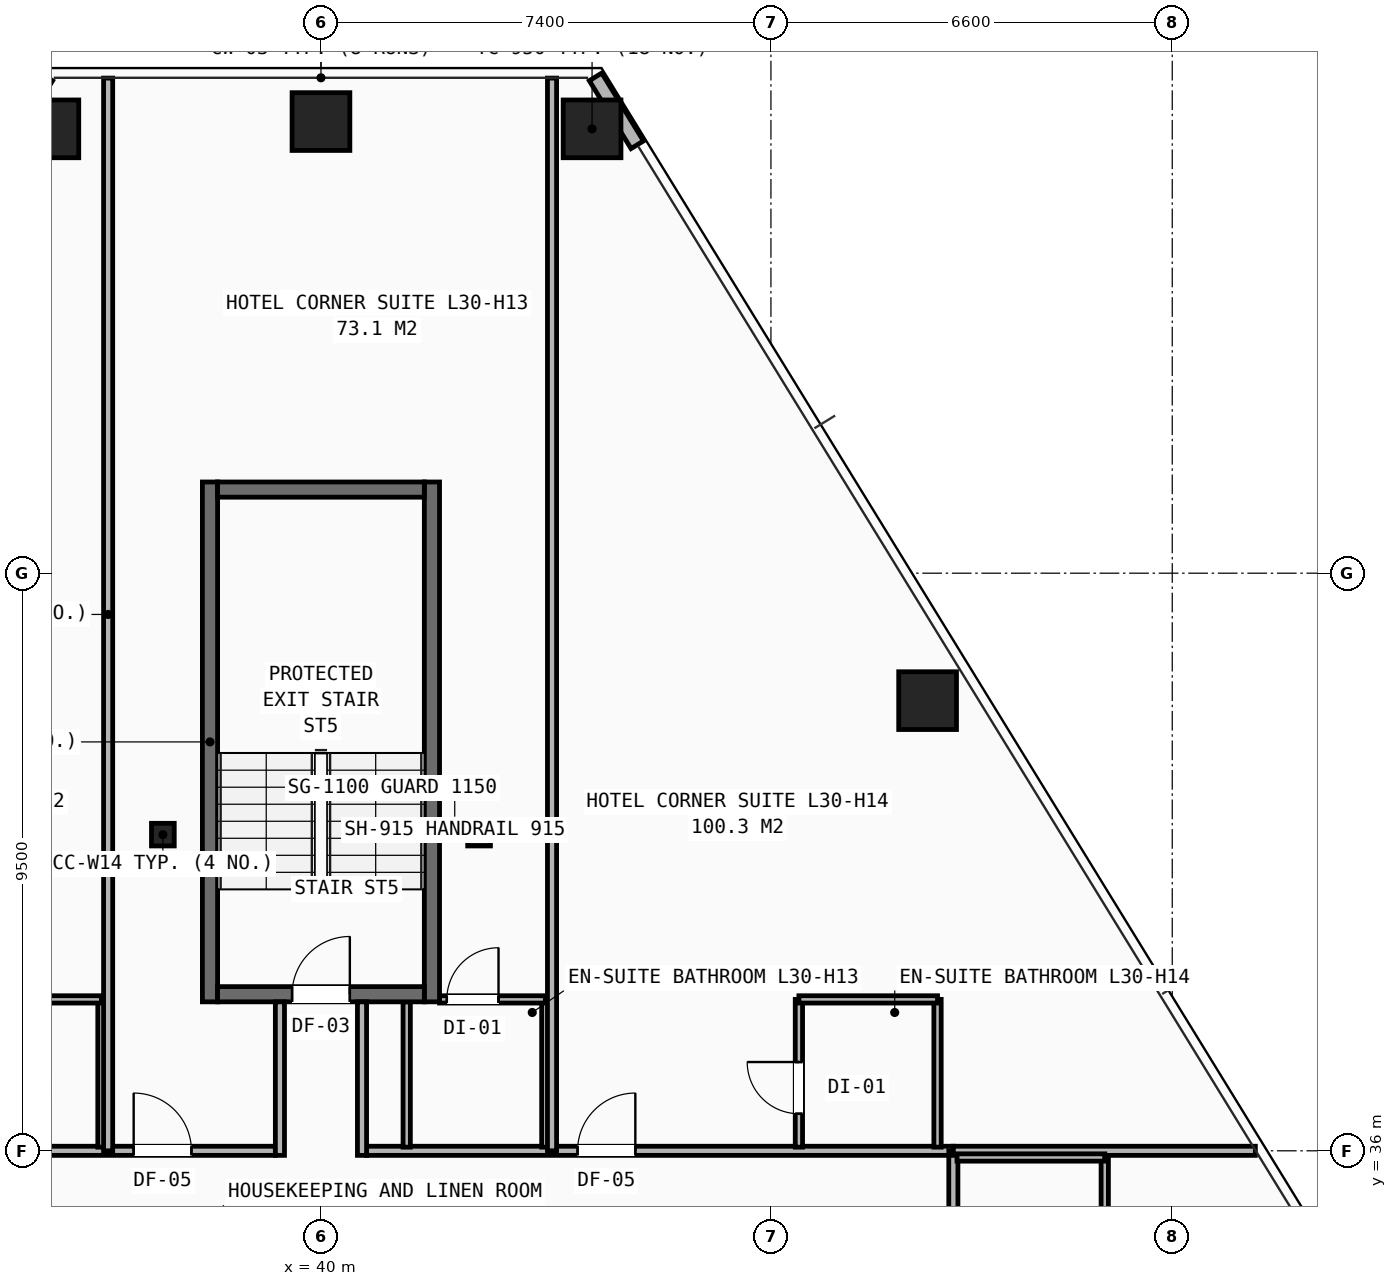
"""IFC4 building model, lengths in metres.
Left out: names, types, materials, properties, quantities, classifications, styles, units other than length and angle.
Written with IfcOpenShell. Run it as: python <this file> out.ifc"""

import sys

from ifc_helpers import new_model, si_unit, direction, frame, frame_2d, origin, origin_2d, place, context, subcontext, project, spatial, rectangle, hollow_rectangle, i_section, extrude, element, fill, save


model = new_model("IFC4")
c1 = context("Model", 3, precision=1e-05, world=origin(), true_north=direction((0.0, 1.0)))
c2 = subcontext(c1, "Body", "Model", "MODEL_VIEW")
j1 = project(units=[si_unit("LENGTHUNIT", "METRE"), si_unit("PLANEANGLEUNIT", "RADIAN")], contexts=[c1])
p1 = place(None, origin())
s1 = spatial("IfcSite", under=j1, at=p1, CompositionType="ELEMENT")
p2 = place(p1, origin())
s2 = spatial("IfcBuilding", under=s1, at=p2, CompositionType="ELEMENT")
p3 = place(p2, frame((0.0, 0.0, 105.4)))
s3 = spatial("IfcBuildingStorey", under=s2, at=p3, CompositionType="ELEMENT", Elevation=105.4)
for number, where, z_axis, x_axis in (
    (1, (37.4, 41.2, 0.0), (0.0, 0.0, 1.0), (1.0, 0.0, 0.0)),
    (2, (42.6, 41.2, 0.0), (0.0, 0.0, 1.0), (1.0, 0.0, 0.0)),
):
    element("IfcColumn", number, at=place(p3, frame(where, z_axis=z_axis, x_axis=x_axis)), inside=s3, PredefinedType="COLUMN", context=c2, shape_type="SweptSolid", body=[
        extrude(i_section(OverallWidth=0.374, OverallDepth=0.372, WebThickness=0.016, FlangeThickness=0.026, at=origin_2d()), origin(), (0.0, 0.0, 1.0), 3.2),
    ])
for number, where, z_axis, x_axis in (
    (3, (44.458, 52.808, 0.0), (0.0, 0.0, 1.0), (1.0, 0.0, 0.0)),
    (4, (40.0, 52.928, 0.0), (0.0, 0.0, 1.0), (1.0, 0.0, 0.0)),
    (5, (35.542, 52.808, 0.0), (0.0, 0.0, 1.0), (1.0, 0.0, 0.0)),
    (6, (49.977, 43.404, 0.0), (0.0, 0.0, 1.0), (1.0, 0.0, 0.0)),
):
    element("IfcColumn", number, at=place(p3, frame(where, z_axis=z_axis, x_axis=x_axis)), inside=s3, PredefinedType="COLUMN", context=c2, shape_type="SweptSolid", body=[
        extrude(hollow_rectangle(XDim=0.95, YDim=0.95, WallThickness=0.065, at=origin_2d()), origin(), (0.0, 0.0, 1.0), 3.2),
    ])
for number, where, z_axis, x_axis in (
    (7, (35.484, 53.663, 0.0), (0.0, 0.0, 1.0), (-0.524, -0.852, 0.0)),
    (8, (45.202, 52.546, 0.0), (0.0, 0.0, 1.0), (-0.524, 0.852, 0.0)),
):
    element("IfcWall", number, at=place(p3, frame(where, z_axis=z_axis, x_axis=x_axis)), inside=s3, PredefinedType="SHEAR", context=c2, shape_type="SweptSolid", body=[
        extrude(rectangle(XDim=1.311, YDim=0.24, at=frame_2d((0.655, 0.0))), origin(), (0.0, 0.0, 1.0), 2.253),
    ])
p4 = place(p3, frame((29.6, 36.0, 0.0), z_axis=(0.0, 0.0, 1.0), x_axis=(1.0, 0.0, 0.0)))
e9 = element("IfcWall", 9, at=p4, inside=s3, PredefinedType="PARTITIONING", context=c2, shape_type="SweptSolid", body=[
    extrude(rectangle(XDim=9.65, YDim=0.15, at=frame_2d((4.825, 0.0))), origin(), (0.0, 0.0, 1.0), 2.503),
])
p5 = place(p4, frame((0.57, 0.0, 0.0)))
e10 = element("IfcOpeningElement", 10, at=p5, cuts=e9, PredefinedType="OPENING", context=c2, shape_type="SweptSolid", body=[
    extrude(rectangle(XDim=0.95, YDim=2.1, at=frame_2d((0.475, 1.05))), frame((0.0, 0.085, 0.0), z_axis=(0.0, -1.0, 0.0), x_axis=(1.0, 0.0, 0.0)), (0.0, 0.0, 1.0), 0.17),
])
p6 = place(p4, frame((7.32, 0.0, 0.0)))
e11 = element("IfcOpeningElement", 11, at=p6, cuts=e9, PredefinedType="OPENING", context=c2, shape_type="SweptSolid", body=[
    extrude(rectangle(XDim=0.95, YDim=2.1, at=frame_2d((0.475, 1.05))), frame((0.0, 0.085, 0.0), z_axis=(0.0, -1.0, 0.0), x_axis=(1.0, 0.0, 0.0)), (0.0, 0.0, 1.0), 0.17),
])
p7 = place(p3, frame((40.75, 36.0, 0.0), z_axis=(0.0, 0.0, 1.0), x_axis=(1.0, 0.0, 0.0)))
e12 = element("IfcWall", 12, at=p7, inside=s3, PredefinedType="PARTITIONING", context=c2, shape_type="SweptSolid", body=[
    extrude(rectangle(XDim=9.65, YDim=0.15, at=frame_2d((4.825, 0.0))), origin(), (0.0, 0.0, 1.0), 2.503),
])
p8 = place(p7, frame((3.47, 0.0, 0.0)))
e13 = element("IfcOpeningElement", 13, at=p8, cuts=e12, PredefinedType="OPENING", context=c2, shape_type="SweptSolid", body=[
    extrude(rectangle(XDim=0.95, YDim=2.1, at=frame_2d((0.475, 1.05))), frame((0.0, 0.085, 0.0), z_axis=(0.0, -1.0, 0.0), x_axis=(1.0, 0.0, 0.0)), (0.0, 0.0, 1.0), 0.17),
])
p9 = place(p3, frame((50.4, 14.1, 0.0), z_axis=(0.0, 0.0, 1.0), x_axis=(0.0, 1.0, 0.0)))
e14 = element("IfcWall", 14, at=p9, inside=s3, PredefinedType="PARTITIONING", context=c2, shape_type="SweptSolid", body=[
    extrude(rectangle(XDim=21.9, YDim=0.15, at=frame_2d((10.95, 0.0))), origin(), (0.0, 0.0, 1.0), 2.421),
])
p10 = place(p9, frame((0.42, 0.0, 0.0)))
e15 = element("IfcOpeningElement", 15, at=p10, cuts=e14, PredefinedType="OPENING", context=c2, shape_type="SweptSolid", body=[
    extrude(rectangle(XDim=0.95, YDim=2.1, at=frame_2d((0.475, 1.05))), frame((0.0, 0.085, 0.0), z_axis=(0.0, -1.0, 0.0), x_axis=(1.0, 0.0, 0.0)), (0.0, 0.0, 1.0), 0.17),
])
p11 = place(p9, frame((5.52, 0.0, 0.0)))
e16 = element("IfcOpeningElement", 16, at=p11, cuts=e14, PredefinedType="OPENING", context=c2, shape_type="SweptSolid", body=[
    extrude(rectangle(XDim=0.95, YDim=2.1, at=frame_2d((0.475, 1.05))), frame((0.0, 0.085, 0.0), z_axis=(0.0, -1.0, 0.0), x_axis=(1.0, 0.0, 0.0)), (0.0, 0.0, 1.0), 0.17),
])
p12 = place(p9, frame((10.92, 0.0, 0.0)))
e17 = element("IfcOpeningElement", 17, at=p12, cuts=e14, PredefinedType="OPENING", context=c2, shape_type="SweptSolid", body=[
    extrude(rectangle(XDim=0.95, YDim=2.1, at=frame_2d((0.475, 1.05))), frame((0.0, 0.085, 0.0), z_axis=(0.0, -1.0, 0.0), x_axis=(1.0, 0.0, 0.0)), (0.0, 0.0, 1.0), 0.17),
])
p13 = place(p9, frame((16.72, 0.0, 0.0)))
e18 = element("IfcOpeningElement", 18, at=p13, cuts=e14, PredefinedType="OPENING", context=c2, shape_type="SweptSolid", body=[
    extrude(rectangle(XDim=0.95, YDim=2.1, at=frame_2d((0.475, 1.05))), frame((0.0, 0.085, 0.0), z_axis=(0.0, -1.0, 0.0), x_axis=(1.0, 0.0, 0.0)), (0.0, 0.0, 1.0), 0.17),
])
p14 = place(p3, frame((50.4, 36.0, 0.0), z_axis=(0.0, 0.0, 1.0), x_axis=(1.0, 0.0, 0.0)))
e19 = element("IfcWall", 19, at=p14, inside=s3, PredefinedType="PARTITIONING", context=c2, shape_type="SweptSolid", body=[
    extrude(rectangle(XDim=4.967, YDim=0.15, at=frame_2d((2.483, 0.0))), origin(), (0.0, 0.0, 1.0), 2.258),
])
p15 = place(p3, frame((52.89, 33.61, 0.0), z_axis=(0.0, 0.0, 1.0), x_axis=(0.0, 1.0, 0.0)))
e20 = element("IfcWall", 20, at=p15, inside=s3, PredefinedType="PARTITIONING", context=c2, shape_type="SweptSolid", body=[
    extrude(rectangle(XDim=2.28, YDim=0.12, at=frame_2d((1.14, 0.0))), origin(), (0.0, 0.0, 1.0), 2.97),
])
for number, where, z_axis, x_axis in (
    (21, (50.46, 35.89, 0.0), (0.0, 0.0, 1.0), (1.0, 0.0, 0.0)),
    (22, (36.39, 36.06, 0.0), (0.0, 0.0, 1.0), (0.0, 1.0, 0.0)),
):
    element("IfcWall", number, at=place(p3, frame(where, z_axis=z_axis, x_axis=x_axis)), inside=s3, PredefinedType="PARTITIONING", context=c2, shape_type="SweptSolid", body=[
        extrude(rectangle(XDim=2.43, YDim=0.12, at=frame_2d((1.215, 0.0))), origin(), (0.0, 0.0, 1.0), 2.97),
    ])
p16 = place(p3, frame((34.11, 38.49, 0.0), z_axis=(0.0, 0.0, 1.0), x_axis=(1.0, 0.0, 0.0)))
e23 = element("IfcWall", 23, at=p16, inside=s3, PredefinedType="PARTITIONING", context=c2, shape_type="SweptSolid", body=[
    extrude(rectangle(XDim=2.28, YDim=0.12, at=frame_2d((1.14, 0.0))), origin(), (0.0, 0.0, 1.0), 2.97),
])
p17 = place(p3, frame((36.5, 36.0, 0.0), z_axis=(0.0, 0.0, 1.0), x_axis=(0.0, 1.0, 0.0)))
e24 = element("IfcWall", 24, at=p17, inside=s3, PredefinedType="PARTITIONING", context=c2, shape_type="SweptSolid", body=[
    extrude(rectangle(XDim=17.643, YDim=0.15, at=frame_2d((8.821, 0.0))), origin(), (0.0, 0.0, 1.0), 2.258),
])
p18 = place(p3, frame((41.41, 36.06, 0.0), z_axis=(0.0, 0.0, 1.0), x_axis=(0.0, 1.0, 0.0)))
e25 = element("IfcWall", 25, at=p18, inside=s3, PredefinedType="PARTITIONING", context=c2, shape_type="SweptSolid", body=[
    extrude(rectangle(XDim=2.39, YDim=0.12, at=frame_2d((1.195, 0.0))), origin(), (0.0, 0.0, 1.0), 2.97),
])
p19 = place(p3, frame((43.69, 36.06, 0.0), z_axis=(0.0, 0.0, 1.0), x_axis=(0.0, 1.0, 0.0)))
e26 = element("IfcWall", 26, at=p19, inside=s3, PredefinedType="PARTITIONING", context=c2, shape_type="SweptSolid", body=[
    extrude(rectangle(XDim=2.43, YDim=0.12, at=frame_2d((1.215, 0.0))), origin(), (0.0, 0.0, 1.0), 2.97),
])
p20 = place(p3, frame((41.95, 38.49, 0.0), z_axis=(0.0, 0.0, 1.0), x_axis=(1.0, 0.0, 0.0)))
e27 = element("IfcWall", 27, at=p20, inside=s3, PredefinedType="PARTITIONING", context=c2, shape_type="SweptSolid", body=[
    extrude(rectangle(XDim=1.74, YDim=0.12, at=frame_2d((0.87, 0.0))), origin(), (0.0, 0.0, 1.0), 2.97),
])
p21 = place(p20, frame((0.12, 0.0, 0.0)))
e28 = element("IfcOpeningElement", 28, at=p21, cuts=e27, PredefinedType="OPENING", context=c2, shape_type="SweptSolid", body=[
    extrude(rectangle(XDim=0.85, YDim=2.05, at=frame_2d((0.425, 1.025))), frame((0.0, 0.07, 0.0), z_axis=(0.0, -1.0, 0.0), x_axis=(1.0, 0.0, 0.0)), (0.0, 0.0, 1.0), 0.14),
])
p22 = place(p3, frame((43.8, 36.0, 0.0), z_axis=(0.0, 0.0, 1.0), x_axis=(0.0, 1.0, 0.0)))
e29 = element("IfcWall", 29, at=p22, inside=s3, PredefinedType="PARTITIONING", context=c2, shape_type="SweptSolid", body=[
    extrude(rectangle(XDim=17.643, YDim=0.15, at=frame_2d((8.821, 0.0))), origin(), (0.0, 0.0, 1.0), 2.258),
])
p23 = place(p3, frame((47.86, 36.06, 0.0), z_axis=(0.0, 0.0, 1.0), x_axis=(0.0, 1.0, 0.0)))
e30 = element("IfcWall", 30, at=p23, inside=s3, PredefinedType="PARTITIONING", context=c2, shape_type="SweptSolid", body=[
    extrude(rectangle(XDim=2.43, YDim=0.12, at=frame_2d((1.215, 0.0))), origin(), (0.0, 0.0, 1.0), 2.503),
])
p24 = place(p23, frame((0.55, 0.0, 0.0)))
e31 = element("IfcOpeningElement", 31, at=p24, cuts=e30, PredefinedType="OPENING", context=c2, shape_type="SweptSolid", body=[
    extrude(rectangle(XDim=0.85, YDim=2.05, at=frame_2d((0.425, 1.025))), frame((0.0, 0.07, 0.0), z_axis=(0.0, -1.0, 0.0), x_axis=(1.0, 0.0, 0.0)), (0.0, 0.0, 1.0), 0.14),
])
p25 = place(p3, frame((50.14, 36.06, 0.0), z_axis=(0.0, 0.0, 1.0), x_axis=(0.0, 1.0, 0.0)))
e32 = element("IfcWall", 32, at=p25, inside=s3, PredefinedType="PARTITIONING", context=c2, shape_type="SweptSolid", body=[
    extrude(rectangle(XDim=2.43, YDim=0.12, at=frame_2d((1.215, 0.0))), origin(), (0.0, 0.0, 1.0), 2.97),
])
p26 = place(p3, frame((47.86, 38.49, 0.0), z_axis=(0.0, 0.0, 1.0), x_axis=(1.0, 0.0, 0.0)))
e33 = element("IfcWall", 33, at=p26, inside=s3, PredefinedType="PARTITIONING", context=c2, shape_type="SweptSolid", body=[
    extrude(rectangle(XDim=2.28, YDim=0.12, at=frame_2d((1.14, 0.0))), origin(), (0.0, 0.0, 1.0), 2.503),
])
for number, where, z_axis, x_axis in (
    (34, (38.175, 38.45, 0.0), (0.0, 0.0, 1.0), (0.0, 1.0, 0.0)),
    (35, (41.825, 38.45, 0.0), (0.0, 0.0, 1.0), (0.0, 1.0, 0.0)),
):
    element("IfcWall", number, at=place(p3, frame(where, z_axis=z_axis, x_axis=x_axis)), inside=s3, PredefinedType="SHEAR", context=c2, shape_type="SweptSolid", body=[
        extrude(rectangle(XDim=8.55, YDim=0.25, at=frame_2d((4.275, 0.0))), origin(), (0.0, 0.0, 1.0), 2.97),
    ])
p27 = place(p3, frame((38.3, 38.575, 0.0), z_axis=(0.0, 0.0, 1.0), x_axis=(1.0, 0.0, 0.0)))
e36 = element("IfcWall", 36, at=p27, inside=s3, PredefinedType="SHEAR", context=c2, shape_type="SweptSolid", body=[
    extrude(rectangle(XDim=3.4, YDim=0.25, at=frame_2d((1.7, 0.0))), origin(), (0.0, 0.0, 1.0), 2.97),
])
p28 = place(p27, frame((1.225, 0.0, 0.0)))
e37 = element("IfcOpeningElement", 37, at=p28, cuts=e36, PredefinedType="OPENING", context=c2, shape_type="SweptSolid", body=[
    extrude(rectangle(XDim=0.95, YDim=2.1, at=frame_2d((0.475, 1.05))), frame((0.0, 0.135, 0.0), z_axis=(0.0, -1.0, 0.0), x_axis=(1.0, 0.0, 0.0)), (0.0, 0.0, 1.0), 0.27),
])
p29 = place(p3, frame((38.3, 46.875, 0.0), z_axis=(0.0, 0.0, 1.0), x_axis=(1.0, 0.0, 0.0)))
e38 = element("IfcWall", 38, at=p29, inside=s3, PredefinedType="SHEAR", context=c2, shape_type="SweptSolid", body=[
    extrude(rectangle(XDim=3.4, YDim=0.25, at=frame_2d((1.7, 0.0))), origin(), (0.0, 0.0, 1.0), 2.97),
])
for number, where, z_axis, x_axis in (
    (39, (39.325, 35.925, 0.0), (0.0, 0.0, 1.0), (0.0, 1.0, 0.0)),
    (40, (40.675, 35.925, 0.0), (0.0, 0.0, 1.0), (0.0, 1.0, 0.0)),
):
    element("IfcWall", number, at=place(p3, frame(where, z_axis=z_axis, x_axis=x_axis)), inside=s3, PredefinedType="PARTITIONING", context=c2, shape_type="SweptSolid", body=[
        extrude(rectangle(XDim=2.525, YDim=0.15, at=frame_2d((1.262, 0.0))), origin(), (0.0, 0.0, 1.0), 2.97),
    ])
p30 = place(p6, origin())
e41 = element("IfcDoor", 41, at=p30, inside=s3, OperationType="SINGLE_SWING_LEFT", PredefinedType="DOOR", context=c2, shape_type="SweptSolid", body=[
    extrude(rectangle(XDim=0.95, YDim=2.1, at=frame_2d((0.475, 1.05))), frame((0.0, 0.025, 0.0), z_axis=(0.0, -1.0, 0.0), x_axis=(1.0, 0.0, 0.0)), (0.0, 0.0, 1.0), 0.05),
])
fill(e11, e41)
p31 = place(p21, origin())
e42 = element("IfcDoor", 42, at=p31, inside=s3, OperationType="SINGLE_SWING_RIGHT", PredefinedType="DOOR", context=c2, shape_type="SweptSolid", body=[
    extrude(rectangle(XDim=0.85, YDim=2.05, at=frame_2d((0.425, 1.025))), frame((0.0, 0.025, 0.0), z_axis=(0.0, -1.0, 0.0), x_axis=(1.0, 0.0, 0.0)), (0.0, 0.0, 1.0), 0.05),
])
fill(e28, e42)
p32 = place(p8, origin())
e43 = element("IfcDoor", 43, at=p32, inside=s3, OperationType="SINGLE_SWING_RIGHT", PredefinedType="DOOR", context=c2, shape_type="SweptSolid", body=[
    extrude(rectangle(XDim=0.95, YDim=2.1, at=frame_2d((0.475, 1.05))), frame((0.0, 0.025, 0.0), z_axis=(0.0, -1.0, 0.0), x_axis=(1.0, 0.0, 0.0)), (0.0, 0.0, 1.0), 0.05),
])
fill(e13, e43)
p33 = place(p24, origin())
e44 = element("IfcDoor", 44, at=p33, inside=s3, OperationType="SINGLE_SWING_RIGHT", PredefinedType="DOOR", context=c2, shape_type="SweptSolid", body=[
    extrude(rectangle(XDim=0.85, YDim=2.05, at=frame_2d((0.425, 1.025))), frame((0.0, 0.025, 0.0), z_axis=(0.0, -1.0, 0.0), x_axis=(1.0, 0.0, 0.0)), (0.0, 0.0, 1.0), 0.05),
])
fill(e31, e44)
p34 = place(p28, origin())
e45 = element("IfcDoor", 45, at=p34, inside=s3, OperationType="SINGLE_SWING_RIGHT", PredefinedType="DOOR", context=c2, shape_type="SweptSolid", body=[
    extrude(rectangle(XDim=0.95, YDim=2.1, at=frame_2d((0.475, 1.05))), frame((0.0, 0.025, 0.0), z_axis=(0.0, -1.0, 0.0), x_axis=(1.0, 0.0, 0.0)), (0.0, 0.0, 1.0), 0.05),
])
fill(e37, e45)
save(model, sys.argv[1])
